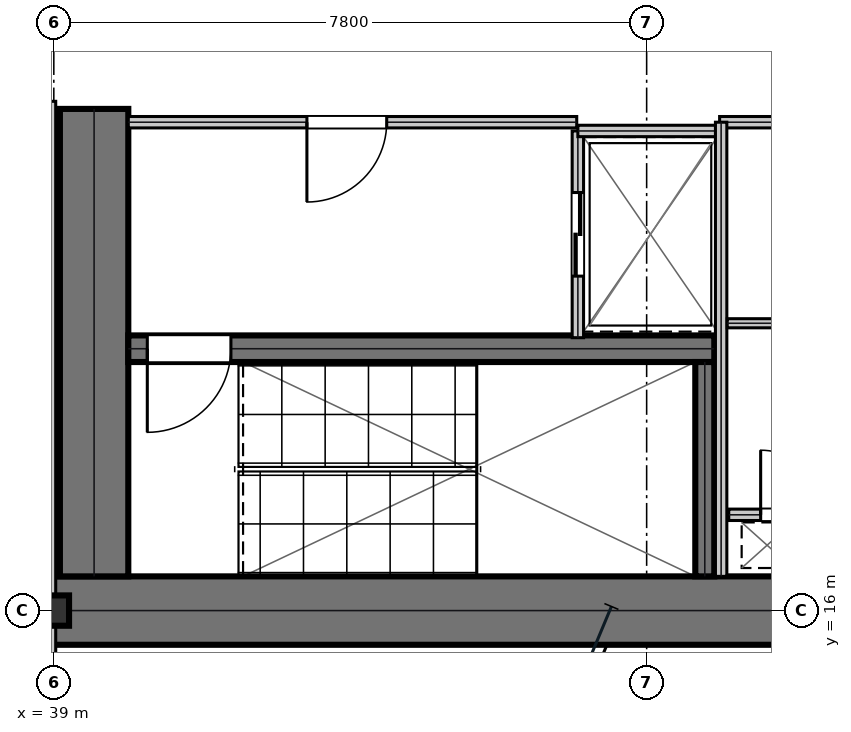
"""IFC4 building model, lengths in metres.
Left out: names, types, materials, properties, quantities, classifications, styles, units other than length and angle.
Written with IfcOpenShell. Run it as: python <this file> out.ifc"""

import sys

from ifc_helpers import new_model, si_unit, direction, frame, frame_2d, origin, origin_2d, place, context, subcontext, project, spatial, rectangle, i_section, extrude, element, fill, save


model = new_model("IFC4")
c1 = context("Model", 3, precision=1e-05, world=origin(), true_north=direction((0.0, 1.0)))
c2 = subcontext(c1, "Body", "Model", "MODEL_VIEW")
j1 = project(units=[si_unit("LENGTHUNIT", "METRE"), si_unit("PLANEANGLEUNIT", "RADIAN")], contexts=[c1])
p1 = place(None, origin())
s1 = spatial("IfcSite", under=j1, at=p1, CompositionType="ELEMENT")
p2 = place(p1, origin())
s2 = spatial("IfcBuilding", under=s1, at=p2, CompositionType="ELEMENT")
p3 = place(p2, frame((0.0, 0.0, 74.25)))
s3 = spatial("IfcBuildingStorey", under=s2, at=p3, CompositionType="ELEMENT", Elevation=74.25)
p4 = place(p3, frame((38.8, 16.0, 0.0), z_axis=(0.0, 0.0, 1.0), x_axis=(1.0, 0.0, 0.0)))
e1 = element("IfcWall", 1, at=p4, inside=s3, PredefinedType="SHEAR", context=c2, shape_type="SweptSolid", body=[
    extrude(rectangle(XDim=16.0, YDim=0.9, at=frame_2d((8.0, 0.0))), origin(), (0.0, 0.0, 1.0), 3.81),
])
p5 = place(p3, frame((39.53, 16.45, 0.0), z_axis=(0.0, 0.0, 1.0), x_axis=(0.0, 1.0, 0.0)))
e2 = element("IfcWall", 2, at=p5, inside=s3, PredefinedType="SHEAR", context=c2, shape_type="SweptSolid", body=[
    extrude(rectangle(XDim=6.15, YDim=0.9, at=frame_2d((3.075, 0.0))), origin(), (0.0, 0.0, 1.0), 3.81),
])
p6 = place(p3, frame((39.98, 19.445, 0.0), z_axis=(0.0, 0.0, 1.0), x_axis=(1.0, 0.0, 0.0)))
e3 = element("IfcWall", 3, at=p6, inside=s3, PredefinedType="SHEAR", context=c2, shape_type="SweptSolid", body=[
    extrude(rectangle(XDim=7.71, YDim=0.35, at=frame_2d((3.855, 0.0))), origin(), (0.0, 0.0, 1.0), 3.81),
])
p7 = place(p6, frame((0.25, 0.0, 0.0)))
e4 = element("IfcOpeningElement", 4, at=p7, cuts=e3, PredefinedType="OPENING", context=c2, shape_type="SweptSolid", body=[
    extrude(rectangle(XDim=1.1, YDim=2.15, at=frame_2d((0.55, 1.075))), frame((0.0, 0.185, 0.0), z_axis=(0.0, -1.0, 0.0), x_axis=(1.0, 0.0, 0.0)), (0.0, 0.0, 1.0), 0.37),
])
p8 = place(p3, frame((47.565, 16.45, 0.0), z_axis=(0.0, 0.0, 1.0), x_axis=(0.0, 1.0, 0.0)))
e5 = element("IfcWall", 5, at=p8, inside=s3, PredefinedType="SHEAR", context=c2, shape_type="SweptSolid", body=[
    extrude(rectangle(XDim=2.82, YDim=0.25, at=frame_2d((1.41, 0.0))), origin(), (0.0, 0.0, 1.0), 3.81),
])
p9 = place(p3, frame((39.0, 16.0, 0.0), z_axis=(0.0, 0.0, 1.0), x_axis=(1.0, 0.0, 0.0)))
e6 = element("IfcColumn", 6, at=p9, inside=s3, PredefinedType="COLUMN", context=c2, shape_type="SweptSolid", body=[
    extrude(i_section(OverallWidth=0.401, OverallDepth=0.399, WebThickness=0.025, FlangeThickness=0.04, at=origin_2d()), origin(), (0.0, 0.0, 1.0), 4.044),
])
p10 = place(p3, frame((39.98, 22.425, 0.0), z_axis=(0.0, 0.0, 1.0), x_axis=(1.0, 0.0, 0.0)))
e7 = element("IfcWall", 7, at=p10, inside=s3, PredefinedType="PARTITIONING", context=c2, shape_type="SweptSolid", body=[
    extrude(rectangle(XDim=5.9, YDim=0.15, at=frame_2d((2.95, 0.0))), origin(), (0.0, 0.0, 1.0), 3.81),
])
p11 = place(p10, frame((2.35, 0.0, 0.0)))
e8 = element("IfcOpeningElement", 8, at=p11, cuts=e7, PredefinedType="OPENING", context=c2, shape_type="SweptSolid", body=[
    extrude(rectangle(XDim=1.05, YDim=2.15, at=frame_2d((0.525, 1.075))), frame((0.0, 0.085, 0.0), z_axis=(0.0, -1.0, 0.0), x_axis=(1.0, 0.0, 0.0)), (0.0, 0.0, 1.0), 0.17),
])
p12 = place(p3, frame((45.895, 19.59, 0.0), z_axis=(0.0, 0.0, 1.0), x_axis=(0.0, 1.0, 0.0)))
e9 = element("IfcWall", 9, at=p12, inside=s3, PredefinedType="PARTITIONING", context=c2, shape_type="SweptSolid", body=[
    extrude(rectangle(XDim=2.72, YDim=0.15, at=frame_2d((1.36, 0.0))), origin(), (0.0, 0.0, 1.0), 3.81),
])
p13 = place(p12, frame((0.81, 0.0, 0.0)))
e10 = element("IfcOpeningElement", 10, at=p13, cuts=e9, PredefinedType="OPENING", context=c2, shape_type="SweptSolid", body=[
    extrude(rectangle(XDim=1.1, YDim=2.15, at=frame_2d((0.55, 1.075))), frame((0.0, 0.085, 0.0), z_axis=(0.0, -1.0, 0.0), x_axis=(1.0, 0.0, 0.0)), (0.0, 0.0, 1.0), 0.17),
])
p14 = place(p3, frame((45.895, 22.31, 0.0), z_axis=(0.0, 0.0, 1.0), x_axis=(1.0, 0.0, 0.0)))
e11 = element("IfcWall", 11, at=p14, inside=s3, PredefinedType="PARTITIONING", context=c2, shape_type="SweptSolid", body=[
    extrude(rectangle(XDim=1.915, YDim=0.15, at=frame_2d((0.958, 0.0))), origin(), (0.0, 0.0, 1.0), 3.81),
])
p15 = place(p3, frame((47.88, 17.26, 0.0), z_axis=(0.0, 0.0, 1.0), x_axis=(1.0, 0.0, 0.0)))
e12 = element("IfcWall", 12, at=p15, inside=s3, PredefinedType="PARTITIONING", context=c2, shape_type="SweptSolid", body=[
    extrude(rectangle(XDim=1.72, YDim=0.15, at=frame_2d((0.86, 0.0))), origin(), (0.0, 0.0, 1.0), 3.81),
])
p16 = place(p15, frame((0.42, 0.0, 0.0)))
e13 = element("IfcOpeningElement", 13, at=p16, cuts=e12, PredefinedType="OPENING", context=c2, shape_type="SweptSolid", body=[
    extrude(rectangle(XDim=0.85, YDim=2.15, at=frame_2d((0.425, 1.075))), frame((0.0, 0.085, 0.0), z_axis=(0.0, -1.0, 0.0), x_axis=(1.0, 0.0, 0.0)), (0.0, 0.0, 1.0), 0.17),
])
p17 = place(p3, frame((47.76, 22.425, 0.0), z_axis=(0.0, 0.0, 1.0), x_axis=(1.0, 0.0, 0.0)))
e14 = element("IfcWall", 14, at=p17, inside=s3, PredefinedType="PARTITIONING", context=c2, shape_type="SweptSolid", body=[
    extrude(rectangle(XDim=1.96, YDim=0.15, at=frame_2d((0.98, 0.0))), origin(), (0.0, 0.0, 1.0), 3.81),
])
p18 = place(p3, frame((47.78, 16.45, 0.0), z_axis=(0.0, 0.0, 1.0), x_axis=(0.0, 1.0, 0.0)))
e15 = element("IfcWall", 15, at=p18, inside=s3, PredefinedType="PARTITIONING", context=c2, shape_type="SweptSolid", body=[
    extrude(rectangle(XDim=5.975, YDim=0.15, at=frame_2d((2.988, 0.0))), origin(), (0.0, 0.0, 1.0), 3.81),
])
p19 = place(p3, frame((47.86, 19.78, 0.0), z_axis=(0.0, 0.0, 1.0), x_axis=(1.0, 0.0, 0.0)))
e16 = element("IfcWall", 16, at=p19, inside=s3, PredefinedType="PARTITIONING", context=c2, shape_type="SweptSolid", body=[
    extrude(rectangle(XDim=1.76, YDim=0.12, at=frame_2d((0.88, 0.0))), origin(), (0.0, 0.0, 1.0), 3.81),
])
p20 = place(p3, frame((38.95, 14.5, 0.0), z_axis=(0.0, 0.0, 1.0), x_axis=(0.0, 1.0, 0.0)))
e17 = element("IfcWall", 17, at=p20, inside=s3, PredefinedType="PARTITIONING", context=c2, shape_type="SweptSolid", body=[
    extrude(rectangle(XDim=8.2, YDim=0.15, at=frame_2d((4.1, 0.0))), origin(), (0.0, 0.0, 1.0), 3.181),
])
p21 = place(p11, frame((1.05, 0.0, 0.0), z_axis=(0.0, 0.0, 1.0), x_axis=(-1.0, 0.0, 0.0)))
e18 = element("IfcDoor", 18, at=p21, inside=s3, OperationType="SINGLE_SWING_RIGHT", PredefinedType="DOOR", context=c2, shape_type="SweptSolid", body=[
    extrude(rectangle(XDim=1.05, YDim=2.15, at=frame_2d((0.525, 1.075))), frame((0.0, 0.025, 0.0), z_axis=(0.0, -1.0, 0.0), x_axis=(1.0, 0.0, 0.0)), (0.0, 0.0, 1.0), 0.05),
])
fill(e8, e18)
p22 = place(p13, frame((1.1, 0.0, 0.0), z_axis=(0.0, 0.0, 1.0), x_axis=(-1.0, 0.0, 0.0)))
e19 = element("IfcDoor", 19, at=p22, inside=s3, OperationType="DOUBLE_DOOR_SLIDING", PredefinedType="DOOR", context=c2, shape_type="SweptSolid", body=[
    extrude(rectangle(XDim=1.1, YDim=2.15, at=frame_2d((0.55, 1.075))), frame((0.0, 0.025, 0.0), z_axis=(0.0, -1.0, 0.0), x_axis=(1.0, 0.0, 0.0)), (0.0, 0.0, 1.0), 0.05),
])
fill(e10, e19)
p23 = place(p16, origin())
e20 = element("IfcDoor", 20, at=p23, inside=s3, OperationType="SINGLE_SWING_LEFT", PredefinedType="TRAPDOOR", context=c2, shape_type="SweptSolid", body=[
    extrude(rectangle(XDim=0.85, YDim=2.15, at=frame_2d((0.425, 1.075))), frame((0.0, 0.025, 0.0), z_axis=(0.0, -1.0, 0.0), x_axis=(1.0, 0.0, 0.0)), (0.0, 0.0, 1.0), 0.05),
])
fill(e13, e20)
p24 = place(p7, frame((1.1, 0.0, 0.0), z_axis=(0.0, 0.0, 1.0), x_axis=(-1.0, 0.0, 0.0)))
e21 = element("IfcDoor", 21, at=p24, inside=s3, OperationType="SINGLE_SWING_RIGHT", PredefinedType="DOOR", context=c2, shape_type="SweptSolid", body=[
    extrude(rectangle(XDim=1.1, YDim=2.15, at=frame_2d((0.55, 1.075))), frame((0.0, 0.025, 0.0), z_axis=(0.0, -1.0, 0.0), x_axis=(1.0, 0.0, 0.0)), (0.0, 0.0, 1.0), 0.05),
])
fill(e4, e21)
save(model, sys.argv[1])
